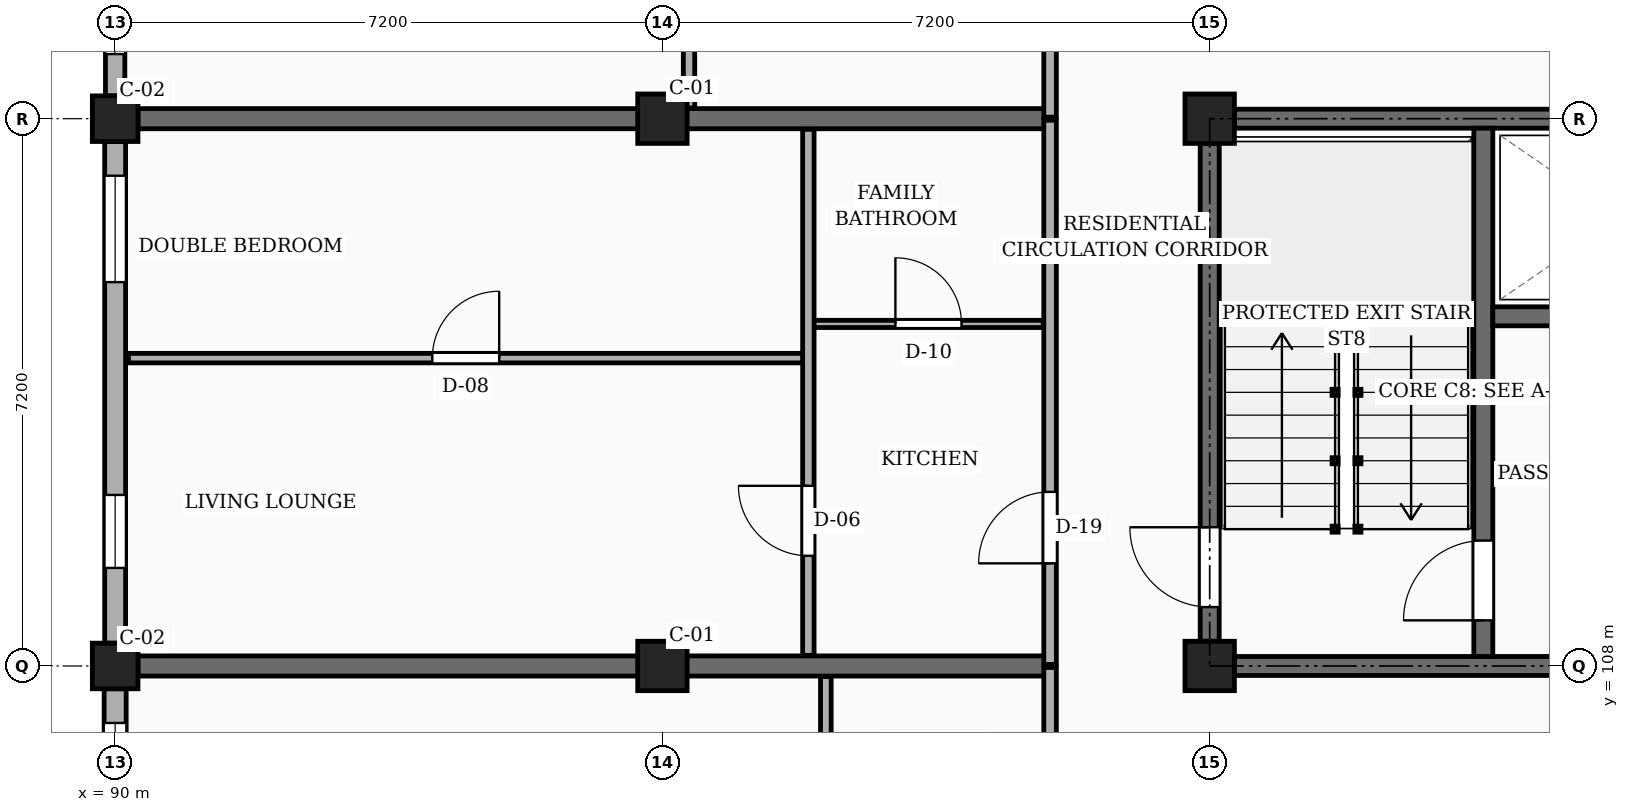
"""IFC4 building model, lengths in metres.
Left out: names, types, materials, properties, quantities, classifications, styles, units other than length and angle.
Written with IfcOpenShell. Run it as: python <this file> out.ifc"""

import sys

from ifc_helpers import new_model, si_unit, direction, frame, frame_2d, origin, origin_2d, place, context, subcontext, project, spatial, rectangle, extrude, element, fill, save


model = new_model("IFC4")
c1 = context("Model", 3, precision=1e-05, world=origin(), true_north=direction((0.0, 1.0)))
c2 = subcontext(c1, "Body", "Model", "MODEL_VIEW")
j1 = project(units=[si_unit("LENGTHUNIT", "METRE"), si_unit("PLANEANGLEUNIT", "RADIAN")], contexts=[c1])
p1 = place(None, origin())
s1 = spatial("IfcSite", under=j1, at=p1, CompositionType="ELEMENT")
p2 = place(p1, origin())
s2 = spatial("IfcBuilding", under=s1, at=p2, CompositionType="ELEMENT")
p3 = place(p2, frame((0.0, 0.0, 4.5)))
s3 = spatial("IfcBuildingStorey", under=s2, at=p3, CompositionType="ELEMENT", Elevation=4.5)
for number, where, z_axis, x_axis in (
    (1, (90.0, 108.0, 0.0), (0.0, 0.0, 1.0), (1.0, 0.0, 0.0)),
    (2, (90.0, 115.2, 0.0), (0.0, 0.0, 1.0), (1.0, 0.0, 0.0)),
):
    element("IfcColumn", number, at=place(p3, frame(where, z_axis=z_axis, x_axis=x_axis)), inside=s3, PredefinedType="COLUMN", context=c2, shape_type="SweptSolid", body=[
        extrude(rectangle(XDim=0.6, YDim=0.6, at=origin_2d()), origin(), (0.0, 0.0, 1.0), 3.15),
    ])
for number, where, z_axis, x_axis in (
    (3, (97.2, 108.0, 0.0), (0.0, 0.0, 1.0), (1.0, 0.0, 0.0)),
    (4, (97.2, 115.2, 0.0), (0.0, 0.0, 1.0), (1.0, 0.0, 0.0)),
    (5, (104.4, 108.0, 0.0), (0.0, 0.0, 1.0), (1.0, 0.0, 0.0)),
    (6, (104.4, 115.2, 0.0), (0.0, 0.0, 1.0), (1.0, 0.0, 0.0)),
):
    element("IfcColumn", number, at=place(p3, frame(where, z_axis=z_axis, x_axis=x_axis)), inside=s3, PredefinedType="COLUMN", context=c2, shape_type="SweptSolid", body=[
        extrude(rectangle(XDim=0.65, YDim=0.65, at=origin_2d()), origin(), (0.0, 0.0, 1.0), 3.15),
    ])
for number, where, z_axis, x_axis in (
    (7, (90.3, 108.0, 0.0), (0.0, 0.0, 1.0), (1.0, 0.0, 0.0)),
    (8, (90.3, 115.2, 0.0), (0.0, 0.0, 1.0), (1.0, 0.0, 0.0)),
):
    element("IfcWall", number, at=place(p3, frame(where, z_axis=z_axis, x_axis=x_axis)), inside=s3, PredefinedType="SOLIDWALL", context=c2, shape_type="SweptSolid", body=[
        extrude(rectangle(XDim=12.0, YDim=0.265, at=frame_2d((6.0, 0.0))), origin(), (0.0, 0.0, 1.0), 2.19),
    ])
p4 = place(p3, frame((90.0, 122.1, 0.0), z_axis=(0.0, 0.0, 1.0), x_axis=(0.0, -1.0, 0.0)))
e9 = element("IfcWall", 9, at=p4, inside=s3, PredefinedType="SOLIDWALL", context=c2, shape_type="SweptSolid", body=[
    extrude(rectangle(XDim=6.6, YDim=0.255, at=frame_2d((3.3, 0.0))), origin(), (0.0, 0.0, 1.0), 2.46),
])
p5 = place(p4, frame((0.45, 0.0, 0.78)))
e10 = element("IfcOpeningElement", 10, at=p5, cuts=e9, PredefinedType="OPENING", context=c2, shape_type="SweptSolid", body=[
    extrude(rectangle(XDim=1.24, YDim=1.15, at=frame_2d((0.62, 0.575))), frame((0.0, 0.137, 0.0), z_axis=(0.0, -1.0, 0.0), x_axis=(1.0, 0.0, 0.0)), (0.0, 0.0, 1.0), 0.275),
])
p6 = place(p4, frame((4.65, 0.0, 0.78)))
e11 = element("IfcOpeningElement", 11, at=p6, cuts=e9, PredefinedType="OPENING", context=c2, shape_type="SweptSolid", body=[
    extrude(rectangle(XDim=1.4, YDim=1.15, at=frame_2d((0.7, 0.575))), frame((0.0, 0.137, 0.0), z_axis=(0.0, -1.0, 0.0), x_axis=(1.0, 0.0, 0.0)), (0.0, 0.0, 1.0), 0.275),
])
p7 = place(p3, frame((90.0, 114.9, 0.0), z_axis=(0.0, 0.0, 1.0), x_axis=(0.0, -1.0, 0.0)))
e12 = element("IfcWall", 12, at=p7, inside=s3, PredefinedType="SOLIDWALL", context=c2, shape_type="SweptSolid", body=[
    extrude(rectangle(XDim=6.6, YDim=0.275, at=frame_2d((3.3, 0.0))), origin(), (0.0, 0.0, 1.0), 2.46),
])
p8 = place(p7, frame((0.45, 0.0, 0.78)))
e13 = element("IfcOpeningElement", 13, at=p8, cuts=e12, PredefinedType="OPENING", context=c2, shape_type="SweptSolid", body=[
    extrude(rectangle(XDim=1.4, YDim=1.15, at=frame_2d((0.7, 0.575))), frame((0.0, 0.147, 0.0), z_axis=(0.0, -1.0, 0.0), x_axis=(1.0, 0.0, 0.0)), (0.0, 0.0, 1.0), 0.295),
])
p9 = place(p7, frame((4.65, 0.0, 0.78)))
e14 = element("IfcOpeningElement", 14, at=p9, cuts=e12, PredefinedType="OPENING", context=c2, shape_type="SweptSolid", body=[
    extrude(rectangle(XDim=0.96, YDim=1.26, at=frame_2d((0.48, 0.63))), frame((0.0, 0.147, 0.0), z_axis=(0.0, -1.0, 0.0), x_axis=(1.0, 0.0, 0.0)), (0.0, 0.0, 1.0), 0.295),
])
p10 = place(p3, frame((90.0, 107.7, 0.0), z_axis=(0.0, 0.0, 1.0), x_axis=(0.0, -1.0, 0.0)))
e15 = element("IfcWall", 15, at=p10, inside=s3, PredefinedType="SOLIDWALL", context=c2, shape_type="SweptSolid", body=[
    extrude(rectangle(XDim=6.6, YDim=0.29, at=frame_2d((3.3, 0.0))), origin(), (0.0, 0.0, 1.0), 2.46),
])
p11 = place(p10, frame((0.45, 0.0, 0.78)))
e16 = element("IfcOpeningElement", 16, at=p11, cuts=e15, PredefinedType="OPENING", context=c2, shape_type="SweptSolid", body=[
    extrude(rectangle(XDim=0.96, YDim=1.26, at=frame_2d((0.48, 0.63))), frame((0.0, 0.155, 0.0), z_axis=(0.0, -1.0, 0.0), x_axis=(1.0, 0.0, 0.0)), (0.0, 0.0, 1.0), 0.31),
])
p12 = place(p10, frame((4.65, 0.0, 0.78)))
e17 = element("IfcOpeningElement", 17, at=p12, cuts=e15, PredefinedType="OPENING", context=c2, shape_type="SweptSolid", body=[
    extrude(rectangle(XDim=1.12, YDim=1.26, at=frame_2d((0.56, 0.63))), frame((0.0, 0.155, 0.0), z_axis=(0.0, -1.0, 0.0), x_axis=(1.0, 0.0, 0.0)), (0.0, 0.0, 1.0), 0.31),
])
p13 = place(p3, frame((104.4, 108.325, 0.0), z_axis=(0.0, 0.0, 1.0), x_axis=(0.0, 1.0, 0.0)))
e18 = element("IfcWall", 18, at=p13, inside=s3, PredefinedType="SHEAR", context=c2, shape_type="SweptSolid", body=[
    extrude(rectangle(XDim=6.55, YDim=0.25, at=frame_2d((3.275, 0.0))), origin(), (0.0, 0.0, 1.0), 2.89),
])
p14 = place(p13, frame((0.45, 0.0, 0.0)))
e19 = element("IfcOpeningElement", 19, at=p14, cuts=e18, PredefinedType="OPENING", context=c2, shape_type="SweptSolid", body=[
    extrude(rectangle(XDim=1.05, YDim=2.15, at=frame_2d((0.525, 1.075))), frame((0.0, 0.135, 0.0), z_axis=(0.0, -1.0, 0.0), x_axis=(1.0, 0.0, 0.0)), (0.0, 0.0, 1.0), 0.27),
])
p15 = place(p3, frame((104.725, 115.2, 0.0), z_axis=(0.0, 0.0, 1.0), x_axis=(1.0, 0.0, 0.0)))
e20 = element("IfcWall", 20, at=p15, inside=s3, PredefinedType="SHEAR", context=c2, shape_type="SweptSolid", body=[
    extrude(rectangle(XDim=6.55, YDim=0.25, at=frame_2d((3.275, 0.0))), origin(), (0.0, 0.0, 1.0), 2.89),
])
p16 = place(p3, frame((104.725, 108.0, 0.0), z_axis=(0.0, 0.0, 1.0), x_axis=(1.0, 0.0, 0.0)))
e21 = element("IfcWall", 21, at=p16, inside=s3, PredefinedType="SHEAR", context=c2, shape_type="SweptSolid", body=[
    extrude(rectangle(XDim=6.55, YDim=0.25, at=frame_2d((3.275, 0.0))), origin(), (0.0, 0.0, 1.0), 2.89),
])
p17 = place(p16, frame((4.425, 0.0, 0.0)))
e22 = element("IfcOpeningElement", 22, at=p17, cuts=e21, PredefinedType="OPENING", context=c2, shape_type="SweptSolid", body=[
    extrude(rectangle(XDim=1.1, YDim=2.15, at=frame_2d((0.55, 1.075))), frame((0.0, 0.135, 0.0), z_axis=(0.0, -1.0, 0.0), x_axis=(1.0, 0.0, 0.0)), (0.0, 0.0, 1.0), 0.27),
])
p18 = place(p3, frame((108.0, 108.125, 0.0), z_axis=(0.0, 0.0, 1.0), x_axis=(0.0, 1.0, 0.0)))
e23 = element("IfcWall", 23, at=p18, inside=s3, PredefinedType="SHEAR", context=c2, shape_type="SweptSolid", body=[
    extrude(rectangle(XDim=6.95, YDim=0.25, at=frame_2d((3.475, 0.0))), origin(), (0.0, 0.0, 1.0), 2.89),
])
p19 = place(p18, frame((0.475, 0.0, 0.0)))
e24 = element("IfcOpeningElement", 24, at=p19, cuts=e23, PredefinedType="OPENING", context=c2, shape_type="SweptSolid", body=[
    extrude(rectangle(XDim=1.05, YDim=2.15, at=frame_2d((0.525, 1.075))), frame((0.0, 0.135, 0.0), z_axis=(0.0, -1.0, 0.0), x_axis=(1.0, 0.0, 0.0)), (0.0, 0.0, 1.0), 0.27),
])
p20 = place(p3, frame((108.125, 112.6, 0.0), z_axis=(0.0, 0.0, 1.0), x_axis=(1.0, 0.0, 0.0)))
e25 = element("IfcWall", 25, at=p20, inside=s3, PredefinedType="SHEAR", context=c2, shape_type="SweptSolid", body=[
    extrude(rectangle(XDim=3.35, YDim=0.25, at=frame_2d((1.675, 0.0))), origin(), (0.0, 0.0, 1.0), 2.89),
])
p21 = place(p20, frame((1.1, 0.0, 0.0)))
e26 = element("IfcOpeningElement", 26, at=p21, cuts=e25, PredefinedType="OPENING", context=c2, shape_type="SweptSolid", body=[
    extrude(rectangle(XDim=1.0, YDim=2.2, at=frame_2d((0.5, 1.1))), frame((0.0, 0.135, 0.0), z_axis=(0.0, -1.0, 0.0), x_axis=(1.0, 0.0, 0.0)), (0.0, 0.0, 1.0), 0.27),
])
p22 = place(p3, frame((102.3, 100.82, 0.0), z_axis=(0.0, 0.0, 1.0), x_axis=(0.0, 1.0, 0.0)))
e27 = element("IfcWall", 27, at=p22, inside=s3, PredefinedType="PARTITIONING", context=c2, shape_type="SweptSolid", body=[
    extrude(rectangle(XDim=7.16, YDim=0.165, at=frame_2d((3.58, 0.0))), origin(), (0.0, 0.0, 1.0), 2.325),
])
p23 = place(p22, frame((1.33, 0.0, 0.0)))
e28 = element("IfcOpeningElement", 28, at=p23, cuts=e27, PredefinedType="OPENING", context=c2, shape_type="SweptSolid", body=[
    extrude(rectangle(XDim=1.0, YDim=2.15, at=frame_2d((0.5, 1.075))), frame((0.0, 0.093, 0.0), z_axis=(0.0, -1.0, 0.0), x_axis=(1.0, 0.0, 0.0)), (0.0, 0.0, 1.0), 0.185),
])
p24 = place(p3, frame((102.3, 108.02, 0.0), z_axis=(0.0, 0.0, 1.0), x_axis=(0.0, 1.0, 0.0)))
e29 = element("IfcWall", 29, at=p24, inside=s3, PredefinedType="PARTITIONING", context=c2, shape_type="SweptSolid", body=[
    extrude(rectangle(XDim=7.16, YDim=0.165, at=frame_2d((3.58, 0.0))), origin(), (0.0, 0.0, 1.0), 2.325),
])
p25 = place(p24, frame((1.33, 0.0, 0.0)))
e30 = element("IfcOpeningElement", 30, at=p25, cuts=e29, PredefinedType="OPENING", context=c2, shape_type="SweptSolid", body=[
    extrude(rectangle(XDim=0.94, YDim=2.12, at=frame_2d((0.47, 1.06))), frame((0.0, 0.093, 0.0), z_axis=(0.0, -1.0, 0.0), x_axis=(1.0, 0.0, 0.0)), (0.0, 0.0, 1.0), 0.185),
])
p26 = place(p3, frame((102.3, 115.22, 0.0), z_axis=(0.0, 0.0, 1.0), x_axis=(0.0, 1.0, 0.0)))
e31 = element("IfcWall", 31, at=p26, inside=s3, PredefinedType="PARTITIONING", context=c2, shape_type="SweptSolid", body=[
    extrude(rectangle(XDim=7.16, YDim=0.165, at=frame_2d((3.58, 0.0))), origin(), (0.0, 0.0, 1.0), 2.325),
])
p27 = place(p26, frame((4.78, 0.0, 0.0)))
e32 = element("IfcOpeningElement", 32, at=p27, cuts=e31, PredefinedType="OPENING", context=c2, shape_type="SweptSolid", body=[
    extrude(rectangle(XDim=1.14, YDim=2.18, at=frame_2d((0.57, 1.09))), frame((0.0, 0.093, 0.0), z_axis=(0.0, -1.0, 0.0), x_axis=(1.0, 0.0, 0.0)), (0.0, 0.0, 1.0), 0.185),
])
p28 = place(p3, frame((99.35, 100.94, 0.0), z_axis=(0.0, 0.0, 1.0), x_axis=(0.0, 1.0, 0.0)))
e33 = element("IfcWall", 33, at=p28, inside=s3, PredefinedType="PARTITIONING", context=c2, shape_type="SweptSolid", body=[
    extrude(rectangle(XDim=6.92, YDim=0.14, at=frame_2d((3.46, 0.0))), origin(), (0.0, 0.0, 1.0), 2.325),
])
p29 = place(p28, frame((1.31, 0.0, 0.0)))
e34 = element("IfcOpeningElement", 34, at=p29, cuts=e33, PredefinedType="OPENING", context=c2, shape_type="SweptSolid", body=[
    extrude(rectangle(XDim=0.95, YDim=2.1, at=frame_2d((0.475, 1.05))), frame((0.0, 0.08, 0.0), z_axis=(0.0, -1.0, 0.0), x_axis=(1.0, 0.0, 0.0)), (0.0, 0.0, 1.0), 0.16),
])
p30 = place(p3, frame((90.175, 112.05, 0.0), z_axis=(0.0, 0.0, 1.0), x_axis=(1.0, 0.0, 0.0)))
e35 = element("IfcWall", 35, at=p30, inside=s3, PredefinedType="PARTITIONING", context=c2, shape_type="SweptSolid", body=[
    extrude(rectangle(XDim=8.875, YDim=0.125, at=frame_2d((4.438, 0.0))), origin(), (0.0, 0.0, 1.0), 2.325),
])
p31 = place(p30, frame((3.998, 0.0, 0.0)))
e36 = element("IfcOpeningElement", 36, at=p31, cuts=e35, PredefinedType="OPENING", context=c2, shape_type="SweptSolid", body=[
    extrude(rectangle(XDim=0.88, YDim=2.08, at=frame_2d((0.44, 1.04))), frame((0.0, 0.073, 0.0), z_axis=(0.0, -1.0, 0.0), x_axis=(1.0, 0.0, 0.0)), (0.0, 0.0, 1.0), 0.145),
])
p32 = place(p3, frame((99.19, 112.5, 0.0), z_axis=(0.0, 0.0, 1.0), x_axis=(1.0, 0.0, 0.0)))
e37 = element("IfcWall", 37, at=p32, inside=s3, PredefinedType="PARTITIONING", context=c2, shape_type="SweptSolid", body=[
    extrude(rectangle(XDim=3.02, YDim=0.095, at=frame_2d((1.51, 0.0))), origin(), (0.0, 0.0, 1.0), 2.325),
])
p33 = place(p32, frame((1.075, 0.0, 0.0)))
e38 = element("IfcOpeningElement", 38, at=p33, cuts=e37, PredefinedType="OPENING", context=c2, shape_type="SweptSolid", body=[
    extrude(rectangle(XDim=0.87, YDim=2.05, at=frame_2d((0.435, 1.025))), frame((0.0, 0.058, 0.0), z_axis=(0.0, -1.0, 0.0), x_axis=(1.0, 0.0, 0.0)), (0.0, 0.0, 1.0), 0.115),
])
p34 = place(p3, frame((99.12, 108.14, 0.0), z_axis=(0.0, 0.0, 1.0), x_axis=(0.0, 1.0, 0.0)))
e39 = element("IfcWall", 39, at=p34, inside=s3, PredefinedType="PARTITIONING", context=c2, shape_type="SweptSolid", body=[
    extrude(rectangle(XDim=6.92, YDim=0.15, at=frame_2d((3.46, 0.0))), origin(), (0.0, 0.0, 1.0), 2.325),
])
p35 = place(p34, frame((1.31, 0.0, 0.0)))
e40 = element("IfcOpeningElement", 40, at=p35, cuts=e39, PredefinedType="OPENING", context=c2, shape_type="SweptSolid", body=[
    extrude(rectangle(XDim=0.92, YDim=2.1, at=frame_2d((0.46, 1.05))), frame((0.0, 0.085, 0.0), z_axis=(0.0, -1.0, 0.0), x_axis=(1.0, 0.0, 0.0)), (0.0, 0.0, 1.0), 0.17),
])
p36 = place(p3, frame((97.55, 115.34, 0.0), z_axis=(0.0, 0.0, 1.0), x_axis=(0.0, 1.0, 0.0)))
e41 = element("IfcWall", 41, at=p36, inside=s3, PredefinedType="PARTITIONING", context=c2, shape_type="SweptSolid", body=[
    extrude(rectangle(XDim=6.92, YDim=0.15, at=frame_2d((3.46, 0.0))), origin(), (0.0, 0.0, 1.0), 2.325),
])
p37 = place(p36, frame((4.66, 0.0, 0.0)))
e42 = element("IfcOpeningElement", 42, at=p37, cuts=e41, PredefinedType="OPENING", context=c2, shape_type="SweptSolid", body=[
    extrude(rectangle(XDim=0.95, YDim=2.1, at=frame_2d((0.475, 1.05))), frame((0.0, 0.085, 0.0), z_axis=(0.0, -1.0, 0.0), x_axis=(1.0, 0.0, 0.0)), (0.0, 0.0, 1.0), 0.17),
])
p38 = place(p6, origin())
e43 = element("IfcWindow", 43, at=p38, inside=s3, PartitioningType="SINGLE_PANEL", PredefinedType="WINDOW", context=c2, shape_type="SweptSolid", body=[
    extrude(rectangle(XDim=1.4, YDim=1.15, at=frame_2d((0.7, 0.575))), frame((0.0, 0.03, 0.0), z_axis=(0.0, -1.0, 0.0), x_axis=(1.0, 0.0, 0.0)), (0.0, 0.0, 1.0), 0.06),
])
fill(e11, e43)
p39 = place(p8, origin())
e44 = element("IfcWindow", 44, at=p39, inside=s3, PartitioningType="SINGLE_PANEL", PredefinedType="WINDOW", context=c2, shape_type="SweptSolid", body=[
    extrude(rectangle(XDim=1.4, YDim=1.15, at=frame_2d((0.7, 0.575))), frame((0.0, 0.03, 0.0), z_axis=(0.0, -1.0, 0.0), x_axis=(1.0, 0.0, 0.0)), (0.0, 0.0, 1.0), 0.06),
])
fill(e13, e44)
p40 = place(p9, origin())
e45 = element("IfcWindow", 45, at=p40, inside=s3, PartitioningType="SINGLE_PANEL", PredefinedType="WINDOW", context=c2, shape_type="SweptSolid", body=[
    extrude(rectangle(XDim=0.96, YDim=1.26, at=frame_2d((0.48, 0.63))), frame((0.0, 0.03, 0.0), z_axis=(0.0, -1.0, 0.0), x_axis=(1.0, 0.0, 0.0)), (0.0, 0.0, 1.0), 0.06),
])
fill(e14, e45)
p41 = place(p11, origin())
e46 = element("IfcWindow", 46, at=p41, inside=s3, PartitioningType="SINGLE_PANEL", PredefinedType="WINDOW", context=c2, shape_type="SweptSolid", body=[
    extrude(rectangle(XDim=0.96, YDim=1.26, at=frame_2d((0.48, 0.63))), frame((0.0, 0.03, 0.0), z_axis=(0.0, -1.0, 0.0), x_axis=(1.0, 0.0, 0.0)), (0.0, 0.0, 1.0), 0.06),
])
fill(e16, e46)
p42 = place(p14, origin())
e47 = element("IfcDoor", 47, at=p42, inside=s3, OperationType="SINGLE_SWING_RIGHT", PredefinedType="DOOR", context=c2, shape_type="SweptSolid", body=[
    extrude(rectangle(XDim=1.05, YDim=2.15, at=frame_2d((0.525, 1.075))), frame((0.0, 0.025, 0.0), z_axis=(0.0, -1.0, 0.0), x_axis=(1.0, 0.0, 0.0)), (0.0, 0.0, 1.0), 0.05),
])
fill(e19, e47)
p43 = place(p19, origin())
e48 = element("IfcDoor", 48, at=p43, inside=s3, OperationType="SINGLE_SWING_LEFT", PredefinedType="DOOR", context=c2, shape_type="SweptSolid", body=[
    extrude(rectangle(XDim=1.05, YDim=2.15, at=frame_2d((0.525, 1.075))), frame((0.0, 0.025, 0.0), z_axis=(0.0, -1.0, 0.0), x_axis=(1.0, 0.0, 0.0)), (0.0, 0.0, 1.0), 0.05),
])
fill(e24, e48)
p44 = place(p25, origin())
e49 = element("IfcDoor", 49, at=p44, inside=s3, OperationType="SINGLE_SWING_LEFT", PredefinedType="DOOR", context=c2, shape_type="SweptSolid", body=[
    extrude(rectangle(XDim=0.94, YDim=2.12, at=frame_2d((0.47, 1.06))), frame((0.0, 0.025, 0.0), z_axis=(0.0, -1.0, 0.0), x_axis=(1.0, 0.0, 0.0)), (0.0, 0.0, 1.0), 0.05),
])
fill(e30, e49)
p45 = place(p31, origin())
e50 = element("IfcDoor", 50, at=p45, inside=s3, OperationType="SINGLE_SWING_RIGHT", PredefinedType="DOOR", context=c2, shape_type="SweptSolid", body=[
    extrude(rectangle(XDim=0.88, YDim=2.08, at=frame_2d((0.44, 1.04))), frame((0.0, 0.025, 0.0), z_axis=(0.0, -1.0, 0.0), x_axis=(1.0, 0.0, 0.0)), (0.0, 0.0, 1.0), 0.05),
])
fill(e36, e50)
p46 = place(p33, origin())
e51 = element("IfcDoor", 51, at=p46, inside=s3, OperationType="SINGLE_SWING_LEFT", PredefinedType="DOOR", context=c2, shape_type="SweptSolid", body=[
    extrude(rectangle(XDim=0.87, YDim=2.05, at=frame_2d((0.435, 1.025))), frame((0.0, 0.025, 0.0), z_axis=(0.0, -1.0, 0.0), x_axis=(1.0, 0.0, 0.0)), (0.0, 0.0, 1.0), 0.05),
])
fill(e38, e51)
p47 = place(p35, origin())
e52 = element("IfcDoor", 52, at=p47, inside=s3, OperationType="SINGLE_SWING_RIGHT", PredefinedType="DOOR", context=c2, shape_type="SweptSolid", body=[
    extrude(rectangle(XDim=0.92, YDim=2.1, at=frame_2d((0.46, 1.05))), frame((0.0, 0.025, 0.0), z_axis=(0.0, -1.0, 0.0), x_axis=(1.0, 0.0, 0.0)), (0.0, 0.0, 1.0), 0.05),
])
fill(e40, e52)
save(model, sys.argv[1])
